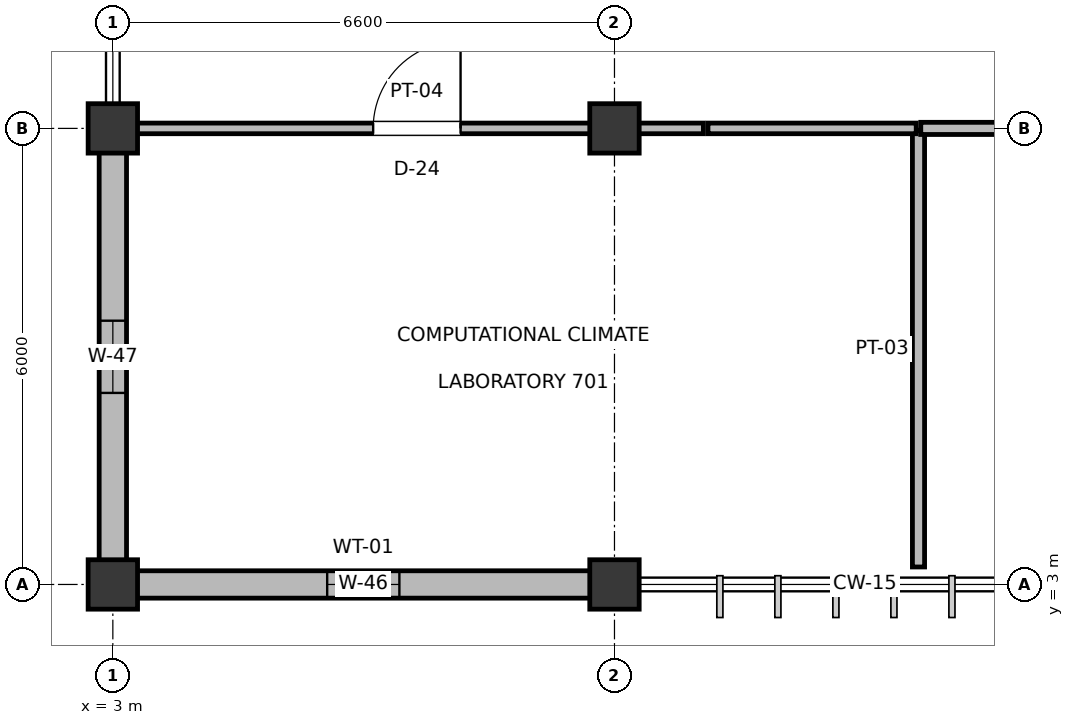
"""IFC4 building model, lengths in metres.
Left out: names, types, materials, properties, quantities, classifications, styles, units other than length and angle.
Written with IfcOpenShell. Run it as: python <this file> out.ifc"""

import sys

from ifc_helpers import new_model, si_unit, direction, frame, frame_2d, origin, origin_2d, place, context, subcontext, project, spatial, rectangle, extrude, element, fill, save


model = new_model("IFC4")
c1 = context("Model", 3, precision=1e-05, world=origin(), true_north=direction((0.0, 1.0)))
c2 = subcontext(c1, "Body", "Model", "MODEL_VIEW")
j1 = project(units=[si_unit("LENGTHUNIT", "METRE"), si_unit("PLANEANGLEUNIT", "RADIAN")], contexts=[c1])
p1 = place(None, origin())
s1 = spatial("IfcSite", under=j1, at=p1, CompositionType="ELEMENT")
p2 = place(p1, origin())
s2 = spatial("IfcBuilding", under=s1, at=p2, CompositionType="ELEMENT")
p3 = place(p2, frame((0.0, 0.0, 33.0)))
s3 = spatial("IfcBuildingStorey", under=s2, at=p3, CompositionType="ELEMENT", Elevation=33.0)
for number, where, z_axis, x_axis in (
    (1, (3.0, 3.0, 0.0), (0.0, 0.0, 1.0), (1.0, 0.0, 0.0)),
    (2, (3.0, 9.0, 0.0), (0.0, 0.0, 1.0), (1.0, 0.0, 0.0)),
    (3, (9.6, 3.0, 0.0), (0.0, 0.0, 1.0), (1.0, 0.0, 0.0)),
    (4, (9.6, 9.0, 0.0), (0.0, 0.0, 1.0), (1.0, 0.0, 0.0)),
):
    element("IfcColumn", number, at=place(p3, frame(where, z_axis=z_axis, x_axis=x_axis)), inside=s3, PredefinedType="COLUMN", context=c2, shape_type="SweptSolid", body=[
        extrude(rectangle(XDim=0.65, YDim=0.65, at=origin_2d()), origin(), (0.0, 0.0, 1.0), 3.8),
    ])
p4 = place(p3, frame((3.305, 3.0, 0.0), z_axis=(0.0, 0.0, 1.0), x_axis=(1.0, 0.0, 0.0)))
e5 = element("IfcWall", 5, at=p4, inside=s3, PredefinedType="SOLIDWALL", context=c2, shape_type="SweptSolid", body=[
    extrude(rectangle(XDim=5.98, YDim=0.36, at=frame_2d((2.99, 0.0))), origin(), (0.0, 0.0, 1.0), 2.875),
])
p5 = place(p4, frame((2.515, 0.0, 0.9)))
e6 = element("IfcOpeningElement", 6, at=p5, cuts=e5, PredefinedType="OPENING", context=c2, shape_type="SweptSolid", body=[
    extrude(rectangle(XDim=0.95, YDim=1.35, at=frame_2d((0.475, 0.675))), frame((0.0, 0.19, 0.0), z_axis=(0.0, -1.0, 0.0), x_axis=(1.0, 0.0, 0.0)), (0.0, 0.0, 1.0), 0.38),
])
p6 = place(p3, frame((3.0, 3.305, 0.0), z_axis=(0.0, 0.0, 1.0), x_axis=(0.0, 1.0, 0.0)))
e7 = element("IfcWall", 7, at=p6, inside=s3, PredefinedType="SOLIDWALL", context=c2, shape_type="SweptSolid", body=[
    extrude(rectangle(XDim=5.38, YDim=0.36, at=frame_2d((2.69, 0.0))), origin(), (0.0, 0.0, 1.0), 2.875),
])
p7 = place(p6, frame((2.215, 0.0, 0.9)))
e8 = element("IfcOpeningElement", 8, at=p7, cuts=e7, PredefinedType="OPENING", context=c2, shape_type="SweptSolid", body=[
    extrude(rectangle(XDim=0.95, YDim=1.55, at=frame_2d((0.475, 0.775))), frame((0.0, 0.19, 0.0), z_axis=(0.0, -1.0, 0.0), x_axis=(1.0, 0.0, 0.0)), (0.0, 0.0, 1.0), 0.38),
])
p8 = place(p3, frame((13.6, 3.23, 0.0), z_axis=(0.0, 0.0, 1.0), x_axis=(0.0, 1.0, 0.0)))
e9 = element("IfcWall", 9, at=p8, inside=s3, PredefinedType="PARTITIONING", context=c2, shape_type="SweptSolid", body=[
    extrude(rectangle(XDim=5.74, YDim=0.16, at=frame_2d((2.87, 0.0))), origin(), (0.0, 0.0, 1.0), 2.825),
])
p9 = place(p3, frame((3.23, 9.0, 0.0), z_axis=(0.0, 0.0, 1.0), x_axis=(1.0, 0.0, 0.0)))
e10 = element("IfcWall", 10, at=p9, inside=s3, PredefinedType="PARTITIONING", context=c2, shape_type="SweptSolid", body=[
    extrude(rectangle(XDim=7.54, YDim=0.14, at=frame_2d((3.77, 0.0))), origin(), (0.0, 0.0, 1.0), 2.795),
])
p10 = place(p9, frame((3.195, 0.0, 0.0)))
e11 = element("IfcOpeningElement", 11, at=p10, cuts=e10, PredefinedType="OPENING", context=c2, shape_type="SweptSolid", body=[
    extrude(rectangle(XDim=1.15, YDim=2.15, at=frame_2d((0.575, 1.075))), frame((0.0, 0.08, 0.0), z_axis=(0.0, -1.0, 0.0), x_axis=(1.0, 0.0, 0.0)), (0.0, 0.0, 1.0), 0.16),
])
p11 = place(p3, frame((10.83, 9.0, 0.0), z_axis=(0.0, 0.0, 1.0), x_axis=(1.0, 0.0, 0.0)))
e12 = element("IfcWall", 12, at=p11, inside=s3, PredefinedType="PARTITIONING", context=c2, shape_type="SweptSolid", body=[
    extrude(rectangle(XDim=2.74, YDim=0.14, at=frame_2d((1.37, 0.0))), origin(), (0.0, 0.0, 1.0), 2.825),
])
p12 = place(p3, frame((13.63, 9.0, 0.0), z_axis=(0.0, 0.0, 1.0), x_axis=(1.0, 0.0, 0.0)))
e13 = element("IfcWall", 13, at=p12, inside=s3, PredefinedType="PARTITIONING", context=c2, shape_type="SweptSolid", body=[
    extrude(rectangle(XDim=7.14, YDim=0.16, at=frame_2d((3.57, 0.0))), origin(), (0.0, 0.0, 1.0), 2.755),
])
p13 = place(p12, frame((3.16, 0.0, 0.0)))
e14 = element("IfcOpeningElement", 14, at=p13, cuts=e13, PredefinedType="OPENING", context=c2, shape_type="SweptSolid", body=[
    extrude(rectangle(XDim=1.18, YDim=2.2, at=frame_2d((0.59, 1.1))), frame((0.0, 0.09, 0.0), z_axis=(0.0, -1.0, 0.0), x_axis=(1.0, 0.0, 0.0)), (0.0, 0.0, 1.0), 0.18),
])
p14 = place(p5, frame((0.95, 0.0, 0.0), z_axis=(0.0, 0.0, 1.0), x_axis=(-1.0, 0.0, 0.0)))
e15 = element("IfcWindow", 15, at=p14, inside=s3, PartitioningType="DOUBLE_PANEL_VERTICAL", PredefinedType="WINDOW", context=c2, shape_type="SweptSolid", body=[
    extrude(rectangle(XDim=0.95, YDim=1.35, at=frame_2d((0.475, 0.675))), frame((0.0, 0.03, 0.0), z_axis=(0.0, -1.0, 0.0), x_axis=(1.0, 0.0, 0.0)), (0.0, 0.0, 1.0), 0.06),
])
fill(e6, e15)
p15 = place(p7, origin())
e16 = element("IfcWindow", 16, at=p15, inside=s3, PartitioningType="DOUBLE_PANEL_VERTICAL", PredefinedType="WINDOW", context=c2, shape_type="SweptSolid", body=[
    extrude(rectangle(XDim=0.95, YDim=1.55, at=frame_2d((0.475, 0.775))), frame((0.0, 0.03, 0.0), z_axis=(0.0, -1.0, 0.0), x_axis=(1.0, 0.0, 0.0)), (0.0, 0.0, 1.0), 0.06),
])
fill(e8, e16)
p16 = place(p10, origin())
e17 = element("IfcDoor", 17, at=p16, inside=s3, OperationType="SINGLE_SWING_RIGHT", PredefinedType="DOOR", context=c2, shape_type="SweptSolid", body=[
    extrude(rectangle(XDim=1.15, YDim=2.15, at=frame_2d((0.575, 1.075))), frame((0.0, 0.025, 0.0), z_axis=(0.0, -1.0, 0.0), x_axis=(1.0, 0.0, 0.0)), (0.0, 0.0, 1.0), 0.05),
])
fill(e11, e17)
save(model, sys.argv[1])
